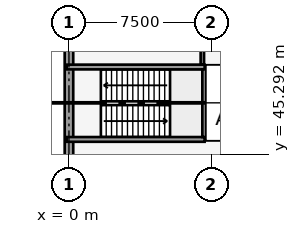
"""IFC4 building model, lengths in metres.
Left out: names, types, materials, properties, quantities, classifications, styles, units other than length and angle.
Written with IfcOpenShell. Run it as: python <this file> out.ifc"""

import sys

from ifc_helpers import new_model, si_unit, direction, frame, frame_2d, origin, origin_2d, place, context, subcontext, project, spatial, rectangle, extrude, element, fill, save


model = new_model("IFC4")
c1 = context("Model", 3, precision=1e-05, world=origin(), true_north=direction((0.0, 1.0)))
c2 = subcontext(c1, "Body", "Model", "MODEL_VIEW")
j1 = project(units=[si_unit("LENGTHUNIT", "METRE"), si_unit("PLANEANGLEUNIT", "RADIAN")], contexts=[c1])
p1 = place(None, origin())
s1 = spatial("IfcSite", under=j1, at=p1, CompositionType="ELEMENT")
p2 = place(p1, origin())
s2 = spatial("IfcBuilding", under=s1, at=p2, CompositionType="ELEMENT")
p3 = place(p2, frame((0.0, 0.0, -4.8)))
s3 = spatial("IfcBuildingStorey", under=s2, at=p3, CompositionType="ELEMENT", Elevation=-4.8)
for number, where, z_axis, x_axis in (
    (1, (0.0, 45.0, 0.0), (0.0, 0.0, 1.0), (1.0, 0.0, 0.0)),
    (2, (7.5, 45.0, 0.0), (0.0, 0.0, 1.0), (1.0, 0.0, 0.0)),
):
    element("IfcColumn", number, at=place(p3, frame(where, z_axis=z_axis, x_axis=x_axis)), inside=s3, PredefinedType="COLUMN", context=c2, shape_type="SweptSolid", body=[
        extrude(rectangle(XDim=0.8, YDim=0.8, at=origin_2d()), origin(), (0.0, 0.0, 1.0), 4.8),
    ])
p4 = place(p3, frame((0.0, 26.25, 0.0), z_axis=(0.0, 0.0, 1.0), x_axis=(0.0, 1.0, 0.0)))
e3 = element("IfcWall", 3, at=p4, inside=s3, PredefinedType="USERDEFINED", context=c2, shape_type="SweptSolid", body=[
    extrude(rectangle(XDim=26.25, YDim=0.45, at=frame_2d((13.125, 0.0))), origin(), (0.0, 0.0, 1.0), 4.5),
])
p5 = place(p3, frame((-0.12, 46.075, 0.0), z_axis=(0.0, 0.0, 1.0), x_axis=(1.0, 0.0, 0.0)))
e4 = element("IfcWall", 4, at=p5, inside=s3, PredefinedType="SOLIDWALL", context=c2, shape_type="SweptSolid", body=[
    extrude(rectangle(XDim=7.26, YDim=0.25, at=frame_2d((3.63, 0.0))), origin(), (0.0, 0.0, 1.0), 4.5),
])
p6 = place(p5, frame((0.56, 0.0, 0.0)))
e5 = element("IfcOpeningElement", 5, at=p6, cuts=e4, PredefinedType="OPENING", context=c2, shape_type="SweptSolid", body=[
    extrude(rectangle(XDim=1.1, YDim=2.15, at=frame_2d((0.55, 1.075))), frame((0.0, 0.135, 0.0), z_axis=(0.0, -1.0, 0.0), x_axis=(1.0, 0.0, 0.0)), (0.0, 0.0, 1.0), 0.27),
])
p7 = place(p3, frame((-0.12, 49.885, 0.0), z_axis=(0.0, 0.0, 1.0), x_axis=(1.0, 0.0, 0.0)))
e6 = element("IfcWall", 6, at=p7, inside=s3, PredefinedType="SOLIDWALL", context=c2, shape_type="SweptSolid", body=[
    extrude(rectangle(XDim=7.26, YDim=0.25, at=frame_2d((3.63, 0.0))), origin(), (0.0, 0.0, 1.0), 4.5),
])
p8 = place(p3, frame((7.145, 46.2, 0.0), z_axis=(0.0, 0.0, 1.0), x_axis=(0.0, 1.0, 0.0)))
e7 = element("IfcWall", 7, at=p8, inside=s3, PredefinedType="SOLIDWALL", context=c2, shape_type="SweptSolid", body=[
    extrude(rectangle(XDim=3.56, YDim=0.25, at=frame_2d((1.78, 0.0))), origin(), (0.0, 0.0, 1.0), 4.5),
])
p9 = place(p3, frame((7.02, 50.024, 0.0), z_axis=(0.0, 0.0, 1.0), x_axis=(0.0, 1.0, 0.0)))
e8 = element("IfcWall", 8, at=p9, inside=s3, PredefinedType="PARTITIONING", context=c2, shape_type="SweptSolid", body=[
    extrude(rectangle(XDim=2.062, YDim=0.18, at=frame_2d((1.031, 0.0))), origin(), (0.0, 0.0, 1.0), 3.77),
])
p10 = place(p6, origin())
e9 = element("IfcDoor", 9, at=p10, inside=s3, OperationType="SINGLE_SWING_LEFT", PredefinedType="DOOR", context=c2, shape_type="SweptSolid", body=[
    extrude(rectangle(XDim=1.1, YDim=2.15, at=frame_2d((0.55, 1.075))), frame((0.0, 0.025, 0.0), z_axis=(0.0, -1.0, 0.0), x_axis=(1.0, 0.0, 0.0)), (0.0, 0.0, 1.0), 0.05),
])
fill(e5, e9)
save(model, sys.argv[1])
